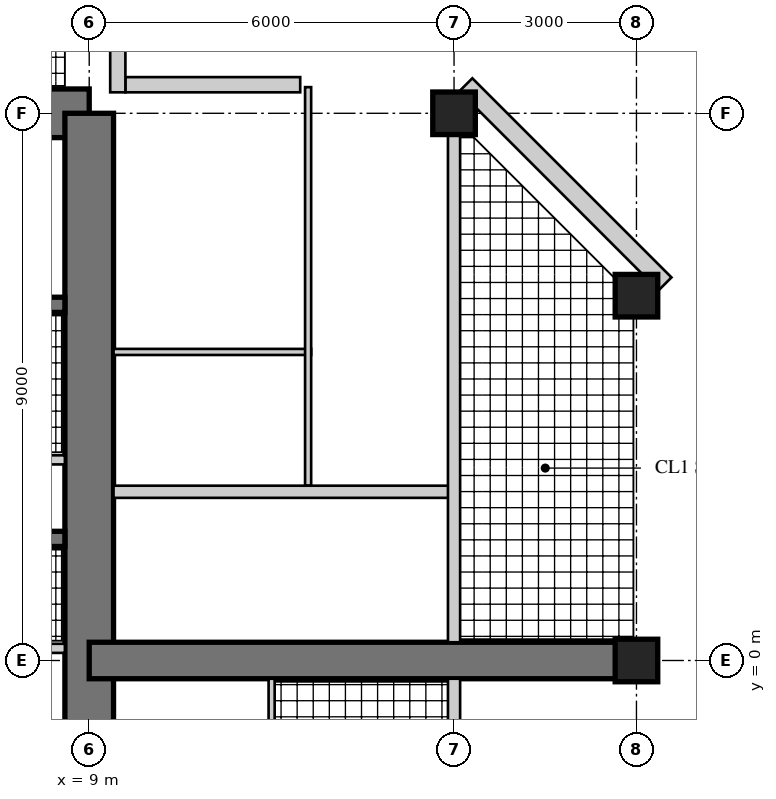
"""IFC4 building model, lengths in metres.
Left out: names, types, materials, properties, quantities, classifications, styles, units other than length and angle.
Written with IfcOpenShell. Run it as: python <this file> out.ifc"""

import sys

from ifc_helpers import new_model, si_unit, direction, frame, frame_2d, origin, origin_2d, place, context, subcontext, project, spatial, rectangle, hollow_rectangle, extrude, element, fill, save


model = new_model("IFC4")
c1 = context("Model", 3, precision=1e-05, world=origin(), true_north=direction((0.0, 1.0)))
c2 = subcontext(c1, "Body", "Model", "MODEL_VIEW")
j1 = project(units=[si_unit("LENGTHUNIT", "METRE"), si_unit("PLANEANGLEUNIT", "RADIAN")], contexts=[c1])
p1 = place(None, origin())
s1 = spatial("IfcSite", under=j1, at=p1, CompositionType="ELEMENT")
p2 = place(p1, origin())
s2 = spatial("IfcBuilding", under=s1, at=p2, CompositionType="ELEMENT")
p3 = place(p2, frame((0.0, 0.0, 261.1)))
s3 = spatial("IfcBuildingStorey", under=s2, at=p3, CompositionType="ELEMENT", Elevation=261.1)
p4 = place(p3, frame((9.0, 9.0, 0.0), z_axis=(0.0, 0.0, 1.0), x_axis=(-1.0, 0.0, 0.0)))
e1 = element("IfcWall", 1, at=p4, inside=s3, PredefinedType="SHEAR", context=c2, shape_type="SweptSolid", body=[
    extrude(rectangle(XDim=18.0, YDim=0.8, at=frame_2d((9.0, 0.0))), origin(), (0.0, 0.0, 1.0), 3.4),
])
p5 = place(p4, frame((9.8, 0.0, 0.0)))
e2 = element("IfcOpeningElement", 2, at=p5, cuts=e1, PredefinedType="OPENING", context=c2, shape_type="SweptSolid", body=[
    extrude(rectangle(XDim=1.0, YDim=2.4, at=frame_2d((0.5, 1.2))), frame((0.0, 0.41, 0.0), z_axis=(0.0, -1.0, 0.0), x_axis=(1.0, 0.0, 0.0)), (0.0, 0.0, 1.0), 0.82),
])
p6 = place(p3, frame((9.0, -9.0, 0.0), z_axis=(0.0, 0.0, 1.0), x_axis=(0.0, 1.0, 0.0)))
e3 = element("IfcWall", 3, at=p6, inside=s3, PredefinedType="SHEAR", context=c2, shape_type="SweptSolid", body=[
    extrude(rectangle(XDim=18.0, YDim=0.8, at=frame_2d((9.0, 0.0))), origin(), (0.0, 0.0, 1.0), 3.4),
])
p7 = place(p6, frame((9.8, 0.0, 0.0)))
e4 = element("IfcOpeningElement", 4, at=p7, cuts=e3, PredefinedType="OPENING", context=c2, shape_type="SweptSolid", body=[
    extrude(rectangle(XDim=1.0, YDim=2.4, at=frame_2d((0.5, 1.2))), frame((0.0, 0.41, 0.0), z_axis=(0.0, -1.0, 0.0), x_axis=(1.0, 0.0, 0.0)), (0.0, 0.0, 1.0), 0.82),
])
p8 = place(p3, frame((1.925, 2.0, 0.0), z_axis=(0.0, 0.0, 1.0), x_axis=(1.0, 0.0, 0.0)))
e5 = element("IfcWall", 5, at=p8, inside=s3, PredefinedType="SHEAR", context=c2, shape_type="SweptSolid", body=[
    extrude(rectangle(XDim=6.675, YDim=0.25, at=frame_2d((3.337, 0.0))), origin(), (0.0, 0.0, 1.0), 3.4),
])
p9 = place(p3, frame((1.925, 5.85, 0.0), z_axis=(0.0, 0.0, 1.0), x_axis=(1.0, 0.0, 0.0)))
e6 = element("IfcWall", 6, at=p9, inside=s3, PredefinedType="SHEAR", context=c2, shape_type="SweptSolid", body=[
    extrude(rectangle(XDim=6.675, YDim=0.25, at=frame_2d((3.337, 0.0))), origin(), (0.0, 0.0, 1.0), 3.4),
])
p10 = place(p9, frame((0.546, 0.0, 0.0)))
e7 = element("IfcOpeningElement", 7, at=p10, cuts=e6, PredefinedType="OPENING", context=c2, shape_type="SweptSolid", body=[
    extrude(rectangle(XDim=1.0, YDim=2.1, at=frame_2d((0.5, 1.05))), frame((0.0, 0.135, 0.0), z_axis=(0.0, -1.0, 0.0), x_axis=(1.0, 0.0, 0.0)), (0.0, 0.0, 1.0), 0.27),
])
p11 = place(p9, frame((2.837, 0.0, 0.0)))
e8 = element("IfcOpeningElement", 8, at=p11, cuts=e6, PredefinedType="OPENING", context=c2, shape_type="SweptSolid", body=[
    extrude(rectangle(XDim=1.0, YDim=2.1, at=frame_2d((0.5, 1.05))), frame((0.0, 0.135, 0.0), z_axis=(0.0, -1.0, 0.0), x_axis=(1.0, 0.0, 0.0)), (0.0, 0.0, 1.0), 0.27),
])
p12 = place(p3, frame((1.925, 3.3, 0.0), z_axis=(0.0, 0.0, 1.0), x_axis=(1.0, 0.0, 0.0)))
e9 = element("IfcWall", 9, at=p12, inside=s3, PredefinedType="PARTITIONING", context=c2, shape_type="SweptSolid", body=[
    extrude(rectangle(XDim=6.675, YDim=0.15, at=frame_2d((3.337, 0.0))), origin(), (0.0, 0.0, 1.0), 3.4),
])
p13 = place(p12, frame((0.075, 0.0, 0.0)))
e10 = element("IfcOpeningElement", 10, at=p13, cuts=e9, PredefinedType="OPENING", context=c2, shape_type="SweptSolid", body=[
    extrude(rectangle(XDim=0.8, YDim=2.1, at=frame_2d((0.4, 1.05))), frame((0.0, 0.085, 0.0), z_axis=(0.0, -1.0, 0.0), x_axis=(1.0, 0.0, 0.0)), (0.0, 0.0, 1.0), 0.17),
])
p14 = place(p12, frame((3.675, 0.0, 0.0)))
e11 = element("IfcOpeningElement", 11, at=p14, cuts=e9, PredefinedType="OPENING", context=c2, shape_type="SweptSolid", body=[
    extrude(rectangle(XDim=0.8, YDim=2.1, at=frame_2d((0.4, 1.05))), frame((0.0, 0.085, 0.0), z_axis=(0.0, -1.0, 0.0), x_axis=(1.0, 0.0, 0.0)), (0.0, 0.0, 1.0), 0.17),
])
p15 = place(p3, frame((9.0, 0.0, 0.0), z_axis=(0.0, 0.0, 1.0), x_axis=(1.0, 0.0, 0.0)))
e12 = element("IfcWall", 12, at=p15, inside=s3, PredefinedType="SHEAR", context=c2, shape_type="SweptSolid", body=[
    extrude(rectangle(XDim=9.0, YDim=0.6, at=frame_2d((4.5, 0.0))), origin(), (0.0, 0.0, 1.0), 3.4),
])
p16 = place(p15, frame((3.8, 0.0, 0.0)))
e13 = element("IfcOpeningElement", 13, at=p16, cuts=e12, PredefinedType="OPENING", context=c2, shape_type="SweptSolid", body=[
    extrude(rectangle(XDim=1.0, YDim=2.15, at=frame_2d((0.5, 1.075))), frame((0.0, 0.31, 0.0), z_axis=(0.0, -1.0, 0.0), x_axis=(1.0, 0.0, 0.0)), (0.0, 0.0, 1.0), 0.62),
])
p17 = place(p15, frame((7.0, 0.0, 0.0)))
e14 = element("IfcOpeningElement", 14, at=p17, cuts=e12, PredefinedType="OPENING", context=c2, shape_type="SweptSolid", body=[
    extrude(rectangle(XDim=1.0, YDim=2.2, at=frame_2d((0.5, 1.1))), frame((0.0, 0.31, 0.0), z_axis=(0.0, -1.0, 0.0), x_axis=(1.0, 0.0, 0.0)), (0.0, 0.0, 1.0), 0.62),
])
for number, where, z_axis, x_axis in (
    (15, (15.0, 9.0, 0.0), (0.0, 0.0, 1.0), (1.0, 0.0, 0.0)),
    (16, (18.0, 0.0, 0.0), (0.0, 0.0, 1.0), (1.0, 0.0, 0.0)),
    (17, (18.0, 6.0, 0.0), (0.0, 0.0, 1.0), (1.0, 0.0, 0.0)),
):
    element("IfcColumn", number, at=place(p3, frame(where, z_axis=z_axis, x_axis=x_axis)), inside=s3, PredefinedType="COLUMN", context=c2, shape_type="SweptSolid", body=[
        extrude(rectangle(XDim=0.7, YDim=0.7, at=origin_2d()), origin(), (0.0, 0.0, 1.0), 3.4),
    ])
p18 = place(p3, frame((18.47, 6.195, 0.0), z_axis=(0.0, 0.0, 1.0), x_axis=(-0.707106781187, 0.707106781187, 0.0)))
e18 = element("IfcWall", 18, at=p18, inside=s3, PredefinedType="SOLIDWALL", context=c2, shape_type="SweptSolid", body=[
    extrude(rectangle(XDim=4.632, YDim=0.3, at=frame_2d((2.316, 0.0))), origin(), (0.0, 0.0, 1.0), 3.22),
])
p19 = place(p18, frame((1.866, 0.0, 0.3)))
e19 = element("IfcOpeningElement", 19, at=p19, cuts=e18, PredefinedType="OPENING", context=c2, shape_type="SweptSolid", body=[
    extrude(rectangle(XDim=0.9, YDim=2.4, at=frame_2d((0.45, 1.2))), frame((0.0, 0.16, 0.0), z_axis=(0.0, -1.0, 0.0), x_axis=(1.0, 0.0, 0.0)), (0.0, 0.0, 1.0), 0.32),
])
p20 = place(p3, frame((12.47, 9.47, 0.0), z_axis=(0.0, 0.0, 1.0), x_axis=(-1.0, 0.0, 0.0)))
e20 = element("IfcWall", 20, at=p20, inside=s3, PredefinedType="SOLIDWALL", context=c2, shape_type="SweptSolid", body=[
    extrude(rectangle(XDim=2.875, YDim=0.25, at=frame_2d((1.438, 0.0))), origin(), (0.0, 0.0, 1.0), 3.22),
])
p21 = place(p20, frame((0.6, 0.0, 0.0)))
e21 = element("IfcOpeningElement", 21, at=p21, cuts=e20, PredefinedType="OPENING", context=c2, shape_type="SweptSolid", body=[
    extrude(rectangle(XDim=1.0, YDim=2.2, at=frame_2d((0.5, 1.1))), frame((0.0, 0.135, 0.0), z_axis=(0.0, -1.0, 0.0), x_axis=(1.0, 0.0, 0.0)), (0.0, 0.0, 1.0), 0.27),
])
p22 = place(p3, frame((9.47, 9.345, 0.0), z_axis=(0.0, 0.0, 1.0), x_axis=(0.0, 1.0, 0.0)))
e22 = element("IfcWall", 22, at=p22, inside=s3, PredefinedType="SOLIDWALL", context=c2, shape_type="SweptSolid", body=[
    extrude(rectangle(XDim=3.125, YDim=0.25, at=frame_2d((1.562, 0.0))), origin(), (0.0, 0.0, 1.0), 3.22),
])
p23 = place(p22, frame((0.6, 0.0, 0.0)))
e23 = element("IfcOpeningElement", 23, at=p23, cuts=e22, PredefinedType="OPENING", context=c2, shape_type="SweptSolid", body=[
    extrude(rectangle(XDim=1.0, YDim=2.2, at=frame_2d((0.5, 1.1))), frame((0.0, 0.135, 0.0), z_axis=(0.0, -1.0, 0.0), x_axis=(1.0, 0.0, 0.0)), (0.0, 0.0, 1.0), 0.27),
])
p24 = place(p3, frame((2.325, 0.2, 0.0), z_axis=(0.0, 0.0, 1.0), x_axis=(1.0, 0.0, 0.0)))
e24 = element("IfcWall", 24, at=p24, inside=s3, PredefinedType="PARTITIONING", context=c2, shape_type="SweptSolid", body=[
    extrude(rectangle(XDim=6.275, YDim=0.15, at=frame_2d((3.138, 0.0))), origin(), (0.0, 0.0, 1.0), 3.22),
])
p25 = place(p24, frame((0.4, 0.0, 0.0)))
e25 = element("IfcOpeningElement", 25, at=p25, cuts=e24, PredefinedType="OPENING", context=c2, shape_type="SweptSolid", body=[
    extrude(rectangle(XDim=1.0, YDim=2.1, at=frame_2d((0.5, 1.05))), frame((0.0, 0.085, 0.0), z_axis=(0.0, -1.0, 0.0), x_axis=(1.0, 0.0, 0.0)), (0.0, 0.0, 1.0), 0.17),
])
p26 = place(p3, frame((9.4, 5.075, 0.0), z_axis=(0.0, 0.0, 1.0), x_axis=(1.0, 0.0, 0.0)))
e26 = element("IfcWall", 26, at=p26, inside=s3, PredefinedType="PARTITIONING", context=c2, shape_type="SweptSolid", body=[
    extrude(rectangle(XDim=3.25, YDim=0.1, at=frame_2d((1.625, 0.0))), origin(), (0.0, 0.0, 1.0), 3.22),
])
p27 = place(p3, frame((12.6, 2.875, 0.0), z_axis=(0.0, 0.0, 1.0), x_axis=(0.0, 1.0, 0.0)))
e27 = element("IfcWall", 27, at=p27, inside=s3, PredefinedType="PARTITIONING", context=c2, shape_type="SweptSolid", body=[
    extrude(rectangle(XDim=6.555, YDim=0.1, at=frame_2d((3.277, 0.0))), origin(), (0.0, 0.0, 1.0), 3.22),
])
p28 = place(p27, frame((0.55, 0.0, 0.0)))
e28 = element("IfcOpeningElement", 28, at=p28, cuts=e27, PredefinedType="OPENING", context=c2, shape_type="SweptSolid", body=[
    extrude(rectangle(XDim=0.9, YDim=2.1, at=frame_2d((0.45, 1.05))), frame((0.0, 0.06, 0.0), z_axis=(0.0, -1.0, 0.0), x_axis=(1.0, 0.0, 0.0)), (0.0, 0.0, 1.0), 0.12),
])
p29 = place(p27, frame((2.65, 0.0, 0.0)))
e29 = element("IfcOpeningElement", 29, at=p29, cuts=e27, PredefinedType="OPENING", context=c2, shape_type="SweptSolid", body=[
    extrude(rectangle(XDim=0.9, YDim=2.1, at=frame_2d((0.45, 1.05))), frame((0.0, 0.06, 0.0), z_axis=(0.0, -1.0, 0.0), x_axis=(1.0, 0.0, 0.0)), (0.0, 0.0, 1.0), 0.12),
])
p30 = place(p3, frame((12.0, -9.345, 0.0), z_axis=(0.0, 0.0, 1.0), x_axis=(0.0, 1.0, 0.0)))
e30 = element("IfcWall", 30, at=p30, inside=s3, PredefinedType="PARTITIONING", context=c2, shape_type="SweptSolid", body=[
    extrude(rectangle(XDim=9.045, YDim=0.1, at=frame_2d((4.522, 0.0))), origin(), (0.0, 0.0, 1.0), 3.22),
])
p31 = place(p30, frame((5.495, 0.0, 0.0)))
e31 = element("IfcOpeningElement", 31, at=p31, cuts=e30, PredefinedType="OPENING", context=c2, shape_type="SweptSolid", body=[
    extrude(rectangle(XDim=0.9, YDim=2.1, at=frame_2d((0.45, 1.05))), frame((0.0, 0.06, 0.0), z_axis=(0.0, -1.0, 0.0), x_axis=(1.0, 0.0, 0.0)), (0.0, 0.0, 1.0), 0.12),
])
p32 = place(p30, frame((7.595, 0.0, 0.0)))
e32 = element("IfcOpeningElement", 32, at=p32, cuts=e30, PredefinedType="OPENING", context=c2, shape_type="SweptSolid", body=[
    extrude(rectangle(XDim=0.9, YDim=2.1, at=frame_2d((0.45, 1.05))), frame((0.0, 0.06, 0.0), z_axis=(0.0, -1.0, 0.0), x_axis=(1.0, 0.0, 0.0)), (0.0, 0.0, 1.0), 0.12),
])
p33 = place(p3, frame((9.4, 2.775, 0.0), z_axis=(0.0, 0.0, 1.0), x_axis=(1.0, 0.0, 0.0)))
e33 = element("IfcWall", 33, at=p33, inside=s3, PredefinedType="SOLIDWALL", context=c2, shape_type="SweptSolid", body=[
    extrude(rectangle(XDim=5.6, YDim=0.2, at=frame_2d((2.8, 0.0))), origin(), (0.0, 0.0, 1.0), 3.22),
])
p34 = place(p33, frame((3.75, 0.0, 0.0)))
e34 = element("IfcOpeningElement", 34, at=p34, cuts=e33, PredefinedType="OPENING", context=c2, shape_type="SweptSolid", body=[
    extrude(rectangle(XDim=1.0, YDim=2.15, at=frame_2d((0.5, 1.075))), frame((0.0, 0.11, 0.0), z_axis=(0.0, -1.0, 0.0), x_axis=(1.0, 0.0, 0.0)), (0.0, 0.0, 1.0), 0.22),
])
p35 = place(p3, frame((15.0, -8.65, 0.0), z_axis=(0.0, 0.0, 1.0), x_axis=(0.0, 1.0, 0.0)))
e35 = element("IfcWall", 35, at=p35, inside=s3, PredefinedType="SOLIDWALL", context=c2, shape_type="SweptSolid", body=[
    extrude(rectangle(XDim=8.35, YDim=0.2, at=frame_2d((4.175, 0.0))), origin(), (0.0, 0.0, 1.0), 2.52),
])
p36 = place(p3, frame((15.0, 0.3, 0.0), z_axis=(0.0, 0.0, 1.0), x_axis=(0.0, 1.0, 0.0)))
e36 = element("IfcWall", 36, at=p36, inside=s3, PredefinedType="SOLIDWALL", context=c2, shape_type="SweptSolid", body=[
    extrude(rectangle(XDim=8.35, YDim=0.2, at=frame_2d((4.175, 0.0))), origin(), (0.0, 0.0, 1.0), 2.52),
])
p37 = place(p36, frame((0.4, 0.0, 0.0)))
e37 = element("IfcOpeningElement", 37, at=p37, cuts=e36, PredefinedType="OPENING", context=c2, shape_type="SweptSolid", body=[
    extrude(rectangle(XDim=1.0, YDim=2.2, at=frame_2d((0.5, 1.1))), frame((0.0, 0.11, 0.0), z_axis=(0.0, -1.0, 0.0), x_axis=(1.0, 0.0, 0.0)), (0.0, 0.0, 1.0), 0.22),
])
p38 = place(p19, origin())
e38 = element("IfcWindow", 38, at=p38, inside=s3, PartitioningType="SINGLE_PANEL", PredefinedType="WINDOW", context=c2, shape_type="SweptSolid", body=[
    extrude(hollow_rectangle(XDim=0.9, YDim=2.4, WallThickness=0.06, at=frame_2d((0.45, 1.2))), frame((0.0, 0.03, 0.0), z_axis=(0.0, -1.0, 0.0), x_axis=(1.0, 0.0, 0.0)), (0.0, 0.0, 1.0), 0.06),
    extrude(rectangle(XDim=0.779, YDim=2.279, at=frame_2d((0.45, 1.2))), frame((0.0, 0.03, 0.0), z_axis=(0.0, -1.0, 0.0), x_axis=(1.0, 0.0, 0.0)), (0.0, 0.0, 1.0), 0.06),
])
fill(e19, e38)
p39 = place(p21, origin())
e39 = element("IfcDoor", 39, at=p39, inside=s3, OperationType="SINGLE_SWING_LEFT", PredefinedType="DOOR", context=c2, shape_type="SweptSolid", body=[
    extrude(hollow_rectangle(XDim=1.0, YDim=2.2, WallThickness=0.06, at=frame_2d((0.5, 1.1))), frame((0.0, 0.025, 0.0), z_axis=(0.0, -1.0, 0.0), x_axis=(1.0, 0.0, 0.0)), (0.0, 0.0, 1.0), 0.05),
    extrude(rectangle(XDim=0.879, YDim=2.079, at=frame_2d((0.5, 1.1))), frame((0.0, 0.025, 0.0), z_axis=(0.0, -1.0, 0.0), x_axis=(1.0, 0.0, 0.0)), (0.0, 0.0, 1.0), 0.05),
])
fill(e21, e39)
p40 = place(p23, origin())
e40 = element("IfcDoor", 40, at=p40, inside=s3, OperationType="SINGLE_SWING_LEFT", PredefinedType="DOOR", context=c2, shape_type="SweptSolid", body=[
    extrude(hollow_rectangle(XDim=1.0, YDim=2.2, WallThickness=0.06, at=frame_2d((0.5, 1.1))), frame((0.0, 0.025, 0.0), z_axis=(0.0, -1.0, 0.0), x_axis=(1.0, 0.0, 0.0)), (0.0, 0.0, 1.0), 0.05),
    extrude(rectangle(XDim=0.879, YDim=2.079, at=frame_2d((0.5, 1.1))), frame((0.0, 0.025, 0.0), z_axis=(0.0, -1.0, 0.0), x_axis=(1.0, 0.0, 0.0)), (0.0, 0.0, 1.0), 0.05),
])
fill(e23, e40)
p41 = place(p28, origin())
e41 = element("IfcDoor", 41, at=p41, inside=s3, OperationType="SINGLE_SWING_LEFT", PredefinedType="DOOR", context=c2, shape_type="SweptSolid", body=[
    extrude(rectangle(XDim=0.9, YDim=2.1, at=frame_2d((0.45, 1.05))), frame((0.0, 0.025, 0.0), z_axis=(0.0, -1.0, 0.0), x_axis=(1.0, 0.0, 0.0)), (0.0, 0.0, 1.0), 0.05),
])
fill(e28, e41)
p42 = place(p29, origin())
e42 = element("IfcDoor", 42, at=p42, inside=s3, OperationType="SINGLE_SWING_LEFT", PredefinedType="DOOR", context=c2, shape_type="SweptSolid", body=[
    extrude(rectangle(XDim=0.9, YDim=2.1, at=frame_2d((0.45, 1.05))), frame((0.0, 0.025, 0.0), z_axis=(0.0, -1.0, 0.0), x_axis=(1.0, 0.0, 0.0)), (0.0, 0.0, 1.0), 0.05),
])
fill(e29, e42)
p43 = place(p32, origin())
e43 = element("IfcDoor", 43, at=p43, inside=s3, OperationType="SINGLE_SWING_RIGHT", PredefinedType="DOOR", context=c2, shape_type="SweptSolid", body=[
    extrude(rectangle(XDim=0.9, YDim=2.1, at=frame_2d((0.45, 1.05))), frame((0.0, 0.025, 0.0), z_axis=(0.0, -1.0, 0.0), x_axis=(1.0, 0.0, 0.0)), (0.0, 0.0, 1.0), 0.05),
])
fill(e32, e43)
p44 = place(p34, origin())
e44 = element("IfcDoor", 44, at=p44, inside=s3, OperationType="SINGLE_SWING_LEFT", PredefinedType="DOOR", context=c2, shape_type="SweptSolid", body=[
    extrude(rectangle(XDim=1.0, YDim=2.15, at=frame_2d((0.5, 1.075))), frame((0.0, 0.025, 0.0), z_axis=(0.0, -1.0, 0.0), x_axis=(1.0, 0.0, 0.0)), (0.0, 0.0, 1.0), 0.05),
])
fill(e34, e44)
p45 = place(p37, frame((1.0, 0.0, 0.0), z_axis=(0.0, 0.0, 1.0), x_axis=(-1.0, 0.0, 0.0)))
e45 = element("IfcDoor", 45, at=p45, inside=s3, OperationType="SINGLE_SWING_RIGHT", PredefinedType="DOOR", context=c2, shape_type="SweptSolid", body=[
    extrude(rectangle(XDim=1.0, YDim=2.2, at=frame_2d((0.5, 1.1))), frame((0.0, 0.025, 0.0), z_axis=(0.0, -1.0, 0.0), x_axis=(1.0, 0.0, 0.0)), (0.0, 0.0, 1.0), 0.05),
])
fill(e37, e45)
p46 = place(p16, frame((1.0, 0.0, 0.0), z_axis=(0.0, 0.0, 1.0), x_axis=(-1.0, 0.0, 0.0)))
e46 = element("IfcDoor", 46, at=p46, inside=s3, OperationType="SINGLE_SWING_RIGHT", PredefinedType="DOOR", context=c2, shape_type="SweptSolid", body=[
    extrude(rectangle(XDim=1.0, YDim=2.15, at=frame_2d((0.5, 1.075))), frame((0.0, 0.025, 0.0), z_axis=(0.0, -1.0, 0.0), x_axis=(1.0, 0.0, 0.0)), (0.0, 0.0, 1.0), 0.05),
])
fill(e13, e46)
p47 = place(p17, frame((1.0, 0.0, 0.0), z_axis=(0.0, 0.0, 1.0), x_axis=(-1.0, 0.0, 0.0)))
e47 = element("IfcDoor", 47, at=p47, inside=s3, OperationType="SINGLE_SWING_RIGHT", PredefinedType="DOOR", context=c2, shape_type="SweptSolid", body=[
    extrude(rectangle(XDim=1.0, YDim=2.2, at=frame_2d((0.5, 1.1))), frame((0.0, 0.025, 0.0), z_axis=(0.0, -1.0, 0.0), x_axis=(1.0, 0.0, 0.0)), (0.0, 0.0, 1.0), 0.05),
])
fill(e14, e47)
p48 = place(p7, origin())
e48 = element("IfcDoor", 48, at=p48, inside=s3, OperationType="SINGLE_SWING_RIGHT", PredefinedType="DOOR", context=c2, shape_type="SweptSolid", body=[
    extrude(rectangle(XDim=1.0, YDim=2.4, at=frame_2d((0.5, 1.2))), frame((0.0, 0.055, 0.0), z_axis=(0.0, -1.0, 0.0), x_axis=(1.0, 0.0, 0.0)), (0.0, 0.0, 1.0), 0.05),
])
fill(e4, e48)
save(model, sys.argv[1])
